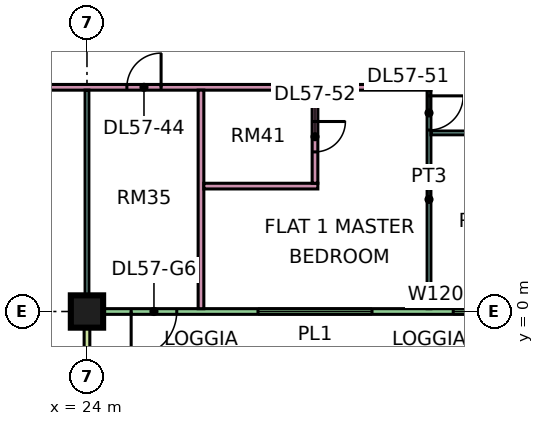
"""IFC4 building model, lengths in metres.
Left out: names, types, materials, properties, quantities, classifications, styles, units other than length and angle.
Written with IfcOpenShell. Run it as: python <this file> out.ifc"""

import sys

from ifc_helpers import new_model, si_unit, direction, frame, frame_2d, origin, origin_2d, place, context, subcontext, project, spatial, rectangle, extrude, element, fill, save


model = new_model("IFC4")
c1 = context("Model", 3, precision=1e-05, world=origin(), true_north=direction((0.0, 1.0)))
c2 = subcontext(c1, "Body", "Model", "MODEL_VIEW")
j1 = project(units=[si_unit("LENGTHUNIT", "METRE"), si_unit("PLANEANGLEUNIT", "RADIAN")], contexts=[c1])
p1 = place(None, origin())
s1 = spatial("IfcSite", under=j1, at=p1, CompositionType="ELEMENT")
p2 = place(p1, origin())
s2 = spatial("IfcBuilding", under=s1, at=p2, CompositionType="ELEMENT")
p3 = place(p2, frame((0.0, 0.0, 241.65)))
s3 = spatial("IfcBuildingStorey", under=s2, at=p3, CompositionType="ELEMENT", Elevation=241.65)
p4 = place(p3, frame((24.0, 0.0, 0.0), z_axis=(0.0, 0.0, 1.0), x_axis=(1.0, 0.0, 0.0)))
e1 = element("IfcColumn", 1, at=p4, inside=s3, PredefinedType="COLUMN", context=c2, shape_type="SweptSolid", body=[
    extrude(rectangle(XDim=0.85, YDim=0.85, at=origin_2d()), origin(), (0.0, 0.0, 1.0), 3.75),
])
p5 = place(p3, frame((24.075, 0.0, 0.0), z_axis=(0.0, 0.0, 1.0), x_axis=(1.0, 0.0, 0.0)))
e2 = element("IfcWall", 2, at=p5, inside=s3, PredefinedType="SOLIDWALL", context=c2, shape_type="SweptSolid", body=[
    extrude(rectangle(XDim=11.85, YDim=0.15, at=frame_2d((5.925, 0.0))), origin(), (0.0, 0.0, 1.0), 3.35),
])
p6 = place(p5, frame((1.087, 0.0, 0.0)))
e3 = element("IfcOpeningElement", 3, at=p6, cuts=e2, PredefinedType="OPENING", context=c2, shape_type="SweptSolid", body=[
    extrude(rectangle(XDim=1.2, YDim=2.4, at=frame_2d((0.6, 1.2))), frame((0.0, 0.085, 0.0), z_axis=(0.0, -1.0, 0.0), x_axis=(1.0, 0.0, 0.0)), (0.0, 0.0, 1.0), 0.17),
])
p7 = place(p5, frame((4.425, 0.0, 0.45)))
e4 = element("IfcOpeningElement", 4, at=p7, cuts=e2, PredefinedType="OPENING", context=c2, shape_type="SweptSolid", body=[
    extrude(rectangle(XDim=3.0, YDim=2.4, at=frame_2d((1.5, 1.2))), frame((0.0, 0.085, 0.0), z_axis=(0.0, -1.0, 0.0), x_axis=(1.0, 0.0, 0.0)), (0.0, 0.0, 1.0), 0.17),
])
p8 = place(p5, frame((9.562, 0.0, 0.45)))
e5 = element("IfcOpeningElement", 5, at=p8, cuts=e2, PredefinedType="OPENING", context=c2, shape_type="SweptSolid", body=[
    extrude(rectangle(XDim=1.2, YDim=2.4, at=frame_2d((0.6, 1.2))), frame((0.0, 0.085, 0.0), z_axis=(0.0, -1.0, 0.0), x_axis=(1.0, 0.0, 0.0)), (0.0, 0.0, 1.0), 0.17),
])
p9 = place(p3, frame((24.0, -1.5, 0.0), z_axis=(0.0, 0.0, 1.0), x_axis=(0.0, 1.0, 0.0)))
e6 = element("IfcWall", 6, at=p9, inside=s3, PredefinedType="SOLIDWALL", context=c2, shape_type="SweptSolid", body=[
    extrude(rectangle(XDim=1.5, YDim=0.15, at=frame_2d((0.75, 0.0))), origin(), (0.0, 0.0, 1.0), 3.35),
])
p10 = place(p3, frame((11.95, 5.9, 0.0), z_axis=(0.0, 0.0, 1.0), x_axis=(1.0, 0.0, 0.0)))
e7 = element("IfcWall", 7, at=p10, inside=s3, PredefinedType="PARTITIONING", context=c2, shape_type="SweptSolid", body=[
    extrude(rectangle(XDim=21.1, YDim=0.15, at=frame_2d((10.55, 0.0))), origin(), (0.0, 0.0, 1.0), 3.35),
])
p11 = place(p10, frame((1.1, 0.0, 0.0)))
e8 = element("IfcOpeningElement", 8, at=p11, cuts=e7, PredefinedType="OPENING", context=c2, shape_type="SweptSolid", body=[
    extrude(rectangle(XDim=0.9, YDim=2.1, at=frame_2d((0.45, 1.05))), frame((0.0, 0.085, 0.0), z_axis=(0.0, -1.0, 0.0), x_axis=(1.0, 0.0, 0.0)), (0.0, 0.0, 1.0), 0.17),
])
p12 = place(p10, frame((13.1, 0.0, 0.0)))
e9 = element("IfcOpeningElement", 9, at=p12, cuts=e7, PredefinedType="OPENING", context=c2, shape_type="SweptSolid", body=[
    extrude(rectangle(XDim=0.9, YDim=2.1, at=frame_2d((0.45, 1.05))), frame((0.0, 0.085, 0.0), z_axis=(0.0, -1.0, 0.0), x_axis=(1.0, 0.0, 0.0)), (0.0, 0.0, 1.0), 0.17),
])
p13 = place(p10, frame((7.1, 0.0, 0.0)))
e10 = element("IfcOpeningElement", 10, at=p13, cuts=e7, PredefinedType="OPENING", context=c2, shape_type="SweptSolid", body=[
    extrude(rectangle(XDim=0.9, YDim=2.1, at=frame_2d((0.45, 1.05))), frame((0.0, 0.085, 0.0), z_axis=(0.0, -1.0, 0.0), x_axis=(1.0, 0.0, 0.0)), (0.0, 0.0, 1.0), 0.17),
])
p14 = place(p3, frame((24.0, 0.0, 0.0), z_axis=(0.0, 0.0, 1.0), x_axis=(0.0, 1.0, 0.0)))
e11 = element("IfcWall", 11, at=p14, inside=s3, PredefinedType="PARTITIONING", context=c2, shape_type="SweptSolid", body=[
    extrude(rectangle(XDim=5.825, YDim=0.1, at=frame_2d((2.913, 0.0))), origin(), (0.0, 0.0, 1.0), 3.35),
])
p15 = place(p3, frame((27.0, 0.074, 0.0), z_axis=(0.0, 0.0, 1.0), x_axis=(0.0, 1.0, 0.0)))
e12 = element("IfcWall", 12, at=p15, inside=s3, PredefinedType="PARTITIONING", context=c2, shape_type="SweptSolid", body=[
    extrude(rectangle(XDim=5.751, YDim=0.15, at=frame_2d((2.875, 0.0))), origin(), (0.0, 0.0, 1.0), 3.35),
])
p16 = place(p3, frame((27.075, 3.3, 0.0), z_axis=(0.0, 0.0, 1.0), x_axis=(1.0, 0.0, 0.0)))
e13 = element("IfcWall", 13, at=p16, inside=s3, PredefinedType="PARTITIONING", context=c2, shape_type="SweptSolid", body=[
    extrude(rectangle(XDim=3.0, YDim=0.15, at=frame_2d((1.5, 0.0))), origin(), (0.0, 0.0, 1.0), 3.35),
])
p17 = place(p3, frame((30.0, 3.375, 0.0), z_axis=(0.0, 0.0, 1.0), x_axis=(0.0, 1.0, 0.0)))
e14 = element("IfcWall", 14, at=p17, inside=s3, PredefinedType="PARTITIONING", context=c2, shape_type="SweptSolid", body=[
    extrude(rectangle(XDim=2.45, YDim=0.15, at=frame_2d((1.225, 0.0))), origin(), (0.0, 0.0, 1.0), 3.35),
])
p18 = place(p17, frame((0.825, 0.0, 0.0)))
e15 = element("IfcOpeningElement", 15, at=p18, cuts=e14, PredefinedType="OPENING", context=c2, shape_type="SweptSolid", body=[
    extrude(rectangle(XDim=0.8, YDim=2.1, at=frame_2d((0.4, 1.05))), frame((0.0, 0.085, 0.0), z_axis=(0.0, -1.0, 0.0), x_axis=(1.0, 0.0, 0.0)), (0.0, 0.0, 1.0), 0.17),
])
p19 = place(p3, frame((33.0, 0.074, 0.0), z_axis=(0.0, 0.0, 1.0), x_axis=(0.0, 1.0, 0.0)))
e16 = element("IfcWall", 16, at=p19, inside=s3, PredefinedType="PARTITIONING", context=c2, shape_type="SweptSolid", body=[
    extrude(rectangle(XDim=5.751, YDim=0.1, at=frame_2d((2.875, 0.0))), origin(), (0.0, 0.0, 1.0), 3.35),
])
p20 = place(p19, frame((4.701, 0.0, 0.0)))
e17 = element("IfcOpeningElement", 17, at=p20, cuts=e16, PredefinedType="OPENING", context=c2, shape_type="SweptSolid", body=[
    extrude(rectangle(XDim=0.9, YDim=2.1, at=frame_2d((0.45, 1.05))), frame((0.0, 0.06, 0.0), z_axis=(0.0, -1.0, 0.0), x_axis=(1.0, 0.0, 0.0)), (0.0, 0.0, 1.0), 0.12),
])
p21 = place(p3, frame((33.05, 4.7, 0.0), z_axis=(0.0, 0.0, 1.0), x_axis=(1.0, 0.0, 0.0)))
e18 = element("IfcWall", 18, at=p21, inside=s3, PredefinedType="PARTITIONING", context=c2, shape_type="SweptSolid", body=[
    extrude(rectangle(XDim=20.85, YDim=0.1, at=frame_2d((10.425, 0.0))), origin(), (0.0, 0.0, 1.0), 3.35),
])
p22 = place(p21, frame((1.0, 0.0, 0.0)))
e19 = element("IfcOpeningElement", 19, at=p22, cuts=e18, PredefinedType="OPENING", context=c2, shape_type="SweptSolid", body=[
    extrude(rectangle(XDim=0.9, YDim=2.1, at=frame_2d((0.45, 1.05))), frame((0.0, 0.06, 0.0), z_axis=(0.0, -1.0, 0.0), x_axis=(1.0, 0.0, 0.0)), (0.0, 0.0, 1.0), 0.12),
])
p23 = place(p21, frame((4.0, 0.0, 0.0)))
e20 = element("IfcOpeningElement", 20, at=p23, cuts=e18, PredefinedType="OPENING", context=c2, shape_type="SweptSolid", body=[
    extrude(rectangle(XDim=0.9, YDim=2.1, at=frame_2d((0.45, 1.05))), frame((0.0, 0.06, 0.0), z_axis=(0.0, -1.0, 0.0), x_axis=(1.0, 0.0, 0.0)), (0.0, 0.0, 1.0), 0.12),
])
p24 = place(p21, frame((7.0, 0.0, 0.0)))
e21 = element("IfcOpeningElement", 21, at=p24, cuts=e18, PredefinedType="OPENING", context=c2, shape_type="SweptSolid", body=[
    extrude(rectangle(XDim=0.9, YDim=2.1, at=frame_2d((0.45, 1.05))), frame((0.0, 0.06, 0.0), z_axis=(0.0, -1.0, 0.0), x_axis=(1.0, 0.0, 0.0)), (0.0, 0.0, 1.0), 0.12),
])
p25 = place(p21, frame((19.0, 0.0, 0.0)))
e22 = element("IfcOpeningElement", 22, at=p25, cuts=e18, PredefinedType="OPENING", context=c2, shape_type="SweptSolid", body=[
    extrude(rectangle(XDim=0.9, YDim=2.1, at=frame_2d((0.45, 1.05))), frame((0.0, 0.06, 0.0), z_axis=(0.0, -1.0, 0.0), x_axis=(1.0, 0.0, 0.0)), (0.0, 0.0, 1.0), 0.12),
])
p26 = place(p21, frame((13.0, 0.0, 0.0)))
e23 = element("IfcOpeningElement", 23, at=p26, cuts=e18, PredefinedType="OPENING", context=c2, shape_type="SweptSolid", body=[
    extrude(rectangle(XDim=0.9, YDim=2.1, at=frame_2d((0.45, 1.05))), frame((0.0, 0.06, 0.0), z_axis=(0.0, -1.0, 0.0), x_axis=(1.0, 0.0, 0.0)), (0.0, 0.0, 1.0), 0.12),
])
p27 = place(p6, frame((1.2, 0.0, 0.0), z_axis=(0.0, 0.0, 1.0), x_axis=(-1.0, 0.0, 0.0)))
e24 = element("IfcDoor", 24, at=p27, inside=s3, OperationType="DOUBLE_DOOR_SINGLE_SWING", PredefinedType="DOOR", context=c2, shape_type="SweptSolid", body=[
    extrude(rectangle(XDim=1.2, YDim=2.4, at=frame_2d((0.6, 1.2))), frame((0.0, 0.025, 0.0), z_axis=(0.0, -1.0, 0.0), x_axis=(1.0, 0.0, 0.0)), (0.0, 0.0, 1.0), 0.05),
])
fill(e3, e24)
p28 = place(p7, origin())
e25 = element("IfcWindow", 25, at=p28, inside=s3, PartitioningType="SINGLE_PANEL", PredefinedType="WINDOW", context=c2, shape_type="SweptSolid", body=[
    extrude(rectangle(XDim=3.0, YDim=2.4, at=frame_2d((1.5, 1.2))), frame((0.0, 0.03, 0.0), z_axis=(0.0, -1.0, 0.0), x_axis=(1.0, 0.0, 0.0)), (0.0, 0.0, 1.0), 0.06),
])
fill(e4, e25)
p29 = place(p8, origin())
e26 = element("IfcWindow", 26, at=p29, inside=s3, PartitioningType="SINGLE_PANEL", PredefinedType="WINDOW", context=c2, shape_type="SweptSolid", body=[
    extrude(rectangle(XDim=1.2, YDim=2.4, at=frame_2d((0.6, 1.2))), frame((0.0, 0.03, 0.0), z_axis=(0.0, -1.0, 0.0), x_axis=(1.0, 0.0, 0.0)), (0.0, 0.0, 1.0), 0.06),
])
fill(e5, e26)
p30 = place(p12, frame((0.9, 0.0, 0.0), z_axis=(0.0, 0.0, 1.0), x_axis=(-1.0, 0.0, 0.0)))
e27 = element("IfcDoor", 27, at=p30, inside=s3, OperationType="SINGLE_SWING_RIGHT", PredefinedType="DOOR", context=c2, shape_type="SweptSolid", body=[
    extrude(rectangle(XDim=0.9, YDim=2.1, at=frame_2d((0.45, 1.05))), frame((0.0, 0.025, 0.0), z_axis=(0.0, -1.0, 0.0), x_axis=(1.0, 0.0, 0.0)), (0.0, 0.0, 1.0), 0.05),
])
fill(e9, e27)
p31 = place(p20, origin())
e28 = element("IfcDoor", 28, at=p31, inside=s3, OperationType="SINGLE_SWING_RIGHT", PredefinedType="DOOR", context=c2, shape_type="SweptSolid", body=[
    extrude(rectangle(XDim=0.9, YDim=2.1, at=frame_2d((0.45, 1.05))), frame((0.0, 0.025, 0.0), z_axis=(0.0, -1.0, 0.0), x_axis=(1.0, 0.0, 0.0)), (0.0, 0.0, 1.0), 0.05),
])
fill(e17, e28)
p32 = place(p18, origin())
e29 = element("IfcDoor", 29, at=p32, inside=s3, OperationType="SINGLE_SWING_RIGHT", PredefinedType="DOOR", context=c2, shape_type="SweptSolid", body=[
    extrude(rectangle(XDim=0.8, YDim=2.1, at=frame_2d((0.4, 1.05))), frame((0.0, 0.025, 0.0), z_axis=(0.0, -1.0, 0.0), x_axis=(1.0, 0.0, 0.0)), (0.0, 0.0, 1.0), 0.05),
])
fill(e15, e29)
save(model, sys.argv[1])
